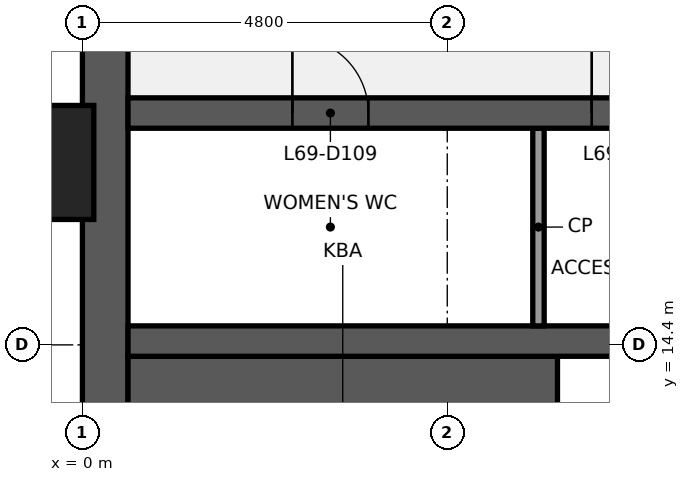
"""IFC4 building model, lengths in metres.
Left out: names, types, materials, properties, quantities, classifications, styles, units other than length and angle.
Written with IfcOpenShell. Run it as: python <this file> out.ifc"""

import sys

from ifc_helpers import new_model, si_unit, direction, frame, frame_2d, origin, origin_2d, place, context, subcontext, project, spatial, rectangle, extrude, element, fill, save


model = new_model("IFC4")
c1 = context("Model", 3, precision=1e-05, world=origin(), true_north=direction((0.0, 1.0)))
c2 = subcontext(c1, "Body", "Model", "MODEL_VIEW")
j1 = project(units=[si_unit("LENGTHUNIT", "METRE"), si_unit("PLANEANGLEUNIT", "RADIAN")], contexts=[c1])
p1 = place(None, origin())
s1 = spatial("IfcSite", under=j1, at=p1, CompositionType="ELEMENT")
p2 = place(p1, origin())
s2 = spatial("IfcBuilding", under=s1, at=p2, CompositionType="ELEMENT")
p3 = place(p2, frame((0.0, 0.0, 314.3)))
s3 = spatial("IfcBuildingStorey", under=s2, at=p3, CompositionType="ELEMENT", Elevation=314.3)
p4 = place(p3, frame((0.3, 9.6, 0.0), z_axis=(0.0, 0.0, 1.0), x_axis=(0.0, 1.0, 0.0)))
e1 = element("IfcWall", 1, at=p4, inside=s3, PredefinedType="SHEAR", context=c2, shape_type="SweptSolid", body=[
    extrude(rectangle(XDim=28.8, YDim=0.6, at=frame_2d((14.4, 0.0))), origin(), (0.0, 0.0, 1.0), 3.84),
])
p5 = place(p4, frame((8.85, 0.0, 0.9)))
e2 = element("IfcOpeningElement", 2, at=p5, cuts=e1, PredefinedType="OPENING", context=c2, shape_type="SweptSolid", body=[
    extrude(rectangle(XDim=1.5, YDim=1.5, at=frame_2d((0.75, 0.75))), frame((0.0, 0.31, 0.0), z_axis=(0.0, -1.0, 0.0), x_axis=(1.0, 0.0, 0.0)), (0.0, 0.0, 1.0), 0.62),
])
p6 = place(p4, frame((18.45, 0.0, 0.9)))
e3 = element("IfcOpeningElement", 3, at=p6, cuts=e1, PredefinedType="OPENING", context=c2, shape_type="SweptSolid", body=[
    extrude(rectangle(XDim=1.5, YDim=1.5, at=frame_2d((0.75, 0.75))), frame((0.0, 0.31, 0.0), z_axis=(0.0, -1.0, 0.0), x_axis=(1.0, 0.0, 0.0)), (0.0, 0.0, 1.0), 0.62),
])
p7 = place(p3, frame((0.6, 12.225, 0.0), z_axis=(0.0, 0.0, 1.0), x_axis=(1.0, 0.0, 0.0)))
e4 = element("IfcWall", 4, at=p7, inside=s3, PredefinedType="SHEAR", context=c2, shape_type="SweptSolid", body=[
    extrude(rectangle(XDim=5.65, YDim=4.05, at=frame_2d((2.825, 0.0))), origin(), (0.0, 0.0, 1.0), 3.84),
])
p8 = place(p3, frame((0.6, 14.45, 0.0), z_axis=(0.0, 0.0, 1.0), x_axis=(1.0, 0.0, 0.0)))
e5 = element("IfcWall", 5, at=p8, inside=s3, PredefinedType="SHEAR", context=c2, shape_type="SweptSolid", body=[
    extrude(rectangle(XDim=18.0, YDim=0.4, at=frame_2d((9.0, 0.0))), origin(), (0.0, 0.0, 1.0), 3.84),
])
p9 = place(p3, frame((6.0, 14.65, 0.0), z_axis=(0.0, 0.0, 1.0), x_axis=(0.0, 1.0, 0.0)))
e6 = element("IfcWall", 6, at=p9, inside=s3, PredefinedType="PARTITIONING", context=c2, shape_type="SweptSolid", body=[
    extrude(rectangle(XDim=2.6, YDim=0.15, at=frame_2d((1.3, 0.0))), origin(), (0.0, 0.0, 1.0), 3.84),
])
p10 = place(p3, frame((0.6, 17.45, 0.0), z_axis=(0.0, 0.0, 1.0), x_axis=(1.0, 0.0, 0.0)))
e7 = element("IfcWall", 7, at=p10, inside=s3, PredefinedType="SHEAR", context=c2, shape_type="SweptSolid", body=[
    extrude(rectangle(XDim=18.0, YDim=0.4, at=frame_2d((9.0, 0.0))), origin(), (0.0, 0.0, 1.0), 3.84),
])
p11 = place(p10, frame((2.163, 0.0, 0.0)))
e8 = element("IfcOpeningElement", 8, at=p11, cuts=e7, PredefinedType="OPENING", context=c2, shape_type="SweptSolid", body=[
    extrude(rectangle(XDim=1.0, YDim=2.1, at=frame_2d((0.5, 1.05))), frame((0.0, 0.21, 0.0), z_axis=(0.0, -1.0, 0.0), x_axis=(1.0, 0.0, 0.0)), (0.0, 0.0, 1.0), 0.42),
])
p12 = place(p10, frame((6.1, 0.0, 0.0)))
e9 = element("IfcOpeningElement", 9, at=p12, cuts=e7, PredefinedType="OPENING", context=c2, shape_type="SweptSolid", body=[
    extrude(rectangle(XDim=1.0, YDim=2.1, at=frame_2d((0.5, 1.05))), frame((0.0, 0.21, 0.0), z_axis=(0.0, -1.0, 0.0), x_axis=(1.0, 0.0, 0.0)), (0.0, 0.0, 1.0), 0.42),
])
p13 = place(p10, frame((8.5, 0.0, 0.0)))
e10 = element("IfcOpeningElement", 10, at=p13, cuts=e7, PredefinedType="OPENING", context=c2, shape_type="SweptSolid", body=[
    extrude(rectangle(XDim=1.0, YDim=2.1, at=frame_2d((0.5, 1.05))), frame((0.0, 0.21, 0.0), z_axis=(0.0, -1.0, 0.0), x_axis=(1.0, 0.0, 0.0)), (0.0, 0.0, 1.0), 0.42),
])
p14 = place(p10, frame((13.637, 0.0, 0.0)))
e11 = element("IfcOpeningElement", 11, at=p14, cuts=e7, PredefinedType="OPENING", context=c2, shape_type="SweptSolid", body=[
    extrude(rectangle(XDim=1.0, YDim=2.1, at=frame_2d((0.5, 1.05))), frame((0.0, 0.21, 0.0), z_axis=(0.0, -1.0, 0.0), x_axis=(1.0, 0.0, 0.0)), (0.0, 0.0, 1.0), 0.42),
])
p15 = place(p3, frame((-0.75, 16.8, 0.0), z_axis=(0.0, 0.0, 1.0), x_axis=(0.0, 1.0, 0.0)))
e12 = element("IfcColumn", 12, at=p15, inside=s3, PredefinedType="PILASTER", context=c2, shape_type="SweptSolid", body=[
    extrude(rectangle(XDim=1.8, YDim=1.5, at=origin_2d()), origin(), (0.0, 0.0, 1.0), 4.0),
])
p16 = place(p11, origin())
e13 = element("IfcDoor", 13, at=p16, inside=s3, OperationType="SINGLE_SWING_LEFT", PredefinedType="DOOR", context=c2, shape_type="SweptSolid", body=[
    extrude(rectangle(XDim=1.0, YDim=2.1, at=frame_2d((0.5, 1.05))), frame((0.0, 0.025, 0.0), z_axis=(0.0, -1.0, 0.0), x_axis=(1.0, 0.0, 0.0)), (0.0, 0.0, 1.0), 0.05),
])
fill(e8, e13)
p17 = place(p12, origin())
e14 = element("IfcDoor", 14, at=p17, inside=s3, OperationType="SINGLE_SWING_LEFT", PredefinedType="DOOR", context=c2, shape_type="SweptSolid", body=[
    extrude(rectangle(XDim=1.0, YDim=2.1, at=frame_2d((0.5, 1.05))), frame((0.0, 0.025, 0.0), z_axis=(0.0, -1.0, 0.0), x_axis=(1.0, 0.0, 0.0)), (0.0, 0.0, 1.0), 0.05),
])
fill(e9, e14)
save(model, sys.argv[1])
